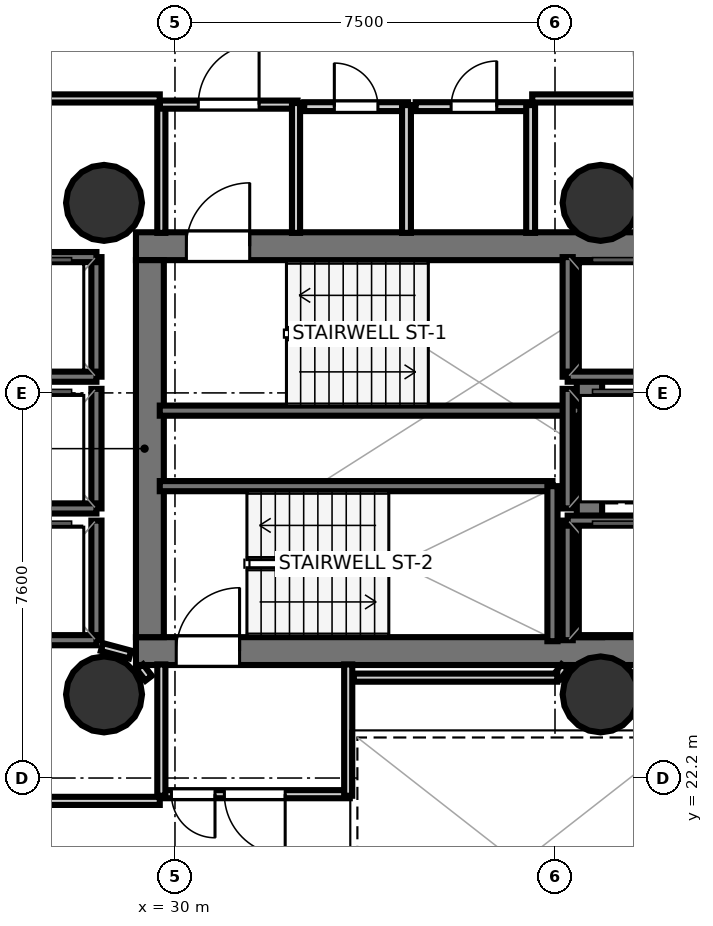
"""IFC4 building model, lengths in metres.
Left out: names, types, materials, properties, quantities, classifications, styles, units other than length and angle.
Written with IfcOpenShell. Run it as: python <this file> out.ifc"""

import sys

from ifc_helpers import new_model, si_unit, direction, frame, frame_2d, origin, origin_2d, place, context, subcontext, project, spatial, rectangle, hollow_circle, extrude, element, fill, save


model = new_model("IFC4")
c1 = context("Model", 3, precision=1e-05, world=origin(), true_north=direction((0.0, 1.0)))
c2 = subcontext(c1, "Body", "Model", "MODEL_VIEW")
j1 = project(units=[si_unit("LENGTHUNIT", "METRE"), si_unit("PLANEANGLEUNIT", "RADIAN")], contexts=[c1])
p1 = place(None, origin())
s1 = spatial("IfcSite", under=j1, at=p1, CompositionType="ELEMENT")
p2 = place(p1, origin())
s2 = spatial("IfcBuilding", under=s1, at=p2, CompositionType="ELEMENT")
p3 = place(p2, frame((0.0, 0.0, 127.4)))
s3 = spatial("IfcBuildingStorey", under=s2, at=p3, CompositionType="ELEMENT", Elevation=127.4)
p4 = place(p3, frame((29.23, 32.695, 0.0), z_axis=(0.0, 0.0, 1.0), x_axis=(1.0, 0.0, 0.0)))
e1 = element("IfcWall", 1, at=p4, inside=s3, PredefinedType="SHEAR", context=c2, shape_type="SweptSolid", body=[
    extrude(rectangle(XDim=10.62, YDim=0.55, at=frame_2d((5.31, 0.0))), origin(), (0.0, 0.0, 1.0), 3.52),
])
p5 = place(p4, frame((0.995, 0.0, 0.0)))
e2 = element("IfcOpeningElement", 2, at=p5, cuts=e1, PredefinedType="OPENING", context=c2, shape_type="SweptSolid", body=[
    extrude(rectangle(XDim=1.25, YDim=2.15, at=frame_2d((0.625, 1.075))), frame((0.0, 0.285, 0.0), z_axis=(0.0, -1.0, 0.0), x_axis=(1.0, 0.0, 0.0)), (0.0, 0.0, 1.0), 0.57),
])
p6 = place(p3, frame((29.23, 24.705, 0.0), z_axis=(0.0, 0.0, 1.0), x_axis=(1.0, 0.0, 0.0)))
e3 = element("IfcWall", 3, at=p6, inside=s3, PredefinedType="SHEAR", context=c2, shape_type="SweptSolid", body=[
    extrude(rectangle(XDim=10.62, YDim=0.55, at=frame_2d((5.31, 0.0))), origin(), (0.0, 0.0, 1.0), 3.52),
])
p7 = place(p6, frame((0.795, 0.0, 0.0)))
e4 = element("IfcOpeningElement", 4, at=p7, cuts=e3, PredefinedType="OPENING", context=c2, shape_type="SweptSolid", body=[
    extrude(rectangle(XDim=1.25, YDim=2.15, at=frame_2d((0.625, 1.075))), frame((0.0, 0.285, 0.0), z_axis=(0.0, -1.0, 0.0), x_axis=(1.0, 0.0, 0.0)), (0.0, 0.0, 1.0), 0.57),
])
p8 = place(p3, frame((29.505, 24.98, 0.0), z_axis=(0.0, 0.0, 1.0), x_axis=(0.0, 1.0, 0.0)))
e5 = element("IfcWall", 5, at=p8, inside=s3, PredefinedType="SHEAR", context=c2, shape_type="SweptSolid", body=[
    extrude(rectangle(XDim=7.44, YDim=0.55, at=frame_2d((3.72, 0.0))), origin(), (0.0, 0.0, 1.0), 3.52),
])
p9 = place(p3, frame((38.18, 24.98, 0.0), z_axis=(0.0, 0.0, 1.0), x_axis=(0.0, 1.0, 0.0)))
e6 = element("IfcWall", 6, at=p9, inside=s3, PredefinedType="SHEAR", context=c2, shape_type="SweptSolid", body=[
    extrude(rectangle(XDim=7.44, YDim=0.5, at=frame_2d((3.72, 0.0))), origin(), (0.0, 0.0, 1.0), 3.52),
])
for number, where, z_axis, x_axis in (
    (7, (28.6, 33.55, 0.0), (0.0, 0.0, 1.0), (1.0, 0.0, 0.0)),
    (8, (28.6, 23.85, 0.0), (0.0, 0.0, 1.0), (1.0, 0.0, 0.0)),
    (9, (38.4, 33.55, 0.0), (0.0, 0.0, 1.0), (1.0, 0.0, 0.0)),
    (10, (38.4, 23.85, 0.0), (0.0, 0.0, 1.0), (1.0, 0.0, 0.0)),
):
    element("IfcColumn", number, at=place(p3, frame(where, z_axis=z_axis, x_axis=x_axis)), inside=s3, PredefinedType="COLUMN", context=c2, shape_type="SweptSolid", body=[
        extrude(hollow_circle(Radius=0.75, WallThickness=0.036, at=origin_2d()), origin(), (0.0, 0.0, 1.0), 3.7),
    ])
p10 = place(p3, frame((29.7, 29.45, 0.0), z_axis=(0.0, 0.0, 1.0), x_axis=(1.0, 0.0, 0.0)))
e11 = element("IfcWall", 11, at=p10, inside=s3, PredefinedType="SOLIDWALL", context=c2, shape_type="SweptSolid", body=[
    extrude(rectangle(XDim=8.3, YDim=0.2, at=frame_2d((4.15, 0.0))), origin(), (0.0, 0.0, 1.0), 3.52),
])
p11 = place(p3, frame((29.7, 27.96, 0.0), z_axis=(0.0, 0.0, 1.0), x_axis=(1.0, 0.0, 0.0)))
e12 = element("IfcWall", 12, at=p11, inside=s3, PredefinedType="SOLIDWALL", context=c2, shape_type="SweptSolid", body=[
    extrude(rectangle(XDim=7.75, YDim=0.2, at=frame_2d((3.875, 0.0))), origin(), (0.0, 0.0, 1.0), 3.52),
])
p12 = place(p3, frame((37.45, 24.9, 0.0), z_axis=(0.0, 0.0, 1.0), x_axis=(0.0, 1.0, 0.0)))
e13 = element("IfcWall", 13, at=p12, inside=s3, PredefinedType="SOLIDWALL", context=c2, shape_type="SweptSolid", body=[
    extrude(rectangle(XDim=3.06, YDim=0.2, at=frame_2d((1.53, 0.0))), origin(), (0.0, 0.0, 1.0), 3.52),
])
p13 = place(p3, frame((37.75, 30.12, 0.0), z_axis=(0.0, 0.0, 1.0), x_axis=(0.0, 1.0, 0.0)))
e14 = element("IfcWall", 14, at=p13, inside=s3, PredefinedType="SOLIDWALL", context=c2, shape_type="SweptSolid", body=[
    extrude(rectangle(XDim=2.36, YDim=0.2, at=frame_2d((1.18, 0.0))), origin(), (0.0, 0.0, 1.0), 3.52),
])
p14 = place(p3, frame((37.75, 30.12, 0.0), z_axis=(0.0, 0.0, 1.0), x_axis=(1.0, 0.0, 0.0)))
e15 = element("IfcWall", 15, at=p14, inside=s3, PredefinedType="SOLIDWALL", context=c2, shape_type="SweptSolid", body=[
    extrude(rectangle(XDim=2.1, YDim=0.2, at=frame_2d((1.05, 0.0))), origin(), (0.0, 0.0, 1.0), 3.52),
])
p15 = place(p3, frame((37.75, 24.92, 0.0), z_axis=(0.0, 0.0, 1.0), x_axis=(0.0, 1.0, 0.0)))
e16 = element("IfcWall", 16, at=p15, inside=s3, PredefinedType="SOLIDWALL", context=c2, shape_type="SweptSolid", body=[
    extrude(rectangle(XDim=2.36, YDim=0.2, at=frame_2d((1.18, 0.0))), origin(), (0.0, 0.0, 1.0), 3.52),
])
p16 = place(p3, frame((37.75, 27.28, 0.0), z_axis=(0.0, 0.0, 1.0), x_axis=(1.0, 0.0, 0.0)))
e17 = element("IfcWall", 17, at=p16, inside=s3, PredefinedType="SOLIDWALL", context=c2, shape_type="SweptSolid", body=[
    extrude(rectangle(XDim=2.1, YDim=0.2, at=frame_2d((1.05, 0.0))), origin(), (0.0, 0.0, 1.0), 3.52),
])
p17 = place(p3, frame((28.45, 30.12, 0.0), z_axis=(0.0, 0.0, 1.0), x_axis=(0.0, 1.0, 0.0)))
e18 = element("IfcWall", 18, at=p17, inside=s3, PredefinedType="SOLIDWALL", context=c2, shape_type="SweptSolid", body=[
    extrude(rectangle(XDim=2.36, YDim=0.2, at=frame_2d((1.18, 0.0))), origin(), (0.0, 0.0, 1.0), 3.52),
])
for number, where, z_axis, x_axis in (
    (19, (26.35, 32.48, 0.0), (0.0, 0.0, 1.0), (1.0, 0.0, 0.0)),
    (20, (26.35, 30.12, 0.0), (0.0, 0.0, 1.0), (1.0, 0.0, 0.0)),
):
    element("IfcWall", number, at=place(p3, frame(where, z_axis=z_axis, x_axis=x_axis)), inside=s3, PredefinedType="SOLIDWALL", context=c2, shape_type="SweptSolid", body=[
        extrude(rectangle(XDim=2.1, YDim=0.2, at=frame_2d((1.05, 0.0))), origin(), (0.0, 0.0, 1.0), 3.52),
    ])
p18 = place(p3, frame((28.45, 27.52, 0.0), z_axis=(0.0, 0.0, 1.0), x_axis=(0.0, 1.0, 0.0)))
e21 = element("IfcWall", 21, at=p18, inside=s3, PredefinedType="SOLIDWALL", context=c2, shape_type="SweptSolid", body=[
    extrude(rectangle(XDim=2.36, YDim=0.2, at=frame_2d((1.18, 0.0))), origin(), (0.0, 0.0, 1.0), 3.52),
])
p19 = place(p3, frame((26.35, 27.52, 0.0), z_axis=(0.0, 0.0, 1.0), x_axis=(1.0, 0.0, 0.0)))
e22 = element("IfcWall", 22, at=p19, inside=s3, PredefinedType="SOLIDWALL", context=c2, shape_type="SweptSolid", body=[
    extrude(rectangle(XDim=2.1, YDim=0.2, at=frame_2d((1.05, 0.0))), origin(), (0.0, 0.0, 1.0), 3.52),
])
p20 = place(p3, frame((28.45, 24.92, 0.0), z_axis=(0.0, 0.0, 1.0), x_axis=(0.0, 1.0, 0.0)))
e23 = element("IfcWall", 23, at=p20, inside=s3, PredefinedType="SOLIDWALL", context=c2, shape_type="SweptSolid", body=[
    extrude(rectangle(XDim=2.36, YDim=0.2, at=frame_2d((1.18, 0.0))), origin(), (0.0, 0.0, 1.0), 3.52),
])
p21 = place(p3, frame((26.35, 24.92, 0.0), z_axis=(0.0, 0.0, 1.0), x_axis=(1.0, 0.0, 0.0)))
e24 = element("IfcWall", 24, at=p21, inside=s3, PredefinedType="SOLIDWALL", context=c2, shape_type="SweptSolid", body=[
    extrude(rectangle(XDim=2.1, YDim=0.2, at=frame_2d((1.05, 0.0))), origin(), (0.0, 0.0, 1.0), 3.52),
])
p22 = place(p3, frame((37.75, 27.52, 0.0), z_axis=(0.0, 0.0, 1.0), x_axis=(0.0, 1.0, 0.0)))
e25 = element("IfcWall", 25, at=p22, inside=s3, PredefinedType="SOLIDWALL", context=c2, shape_type="SweptSolid", body=[
    extrude(rectangle(XDim=2.36, YDim=0.2, at=frame_2d((1.18, 0.0))), origin(), (0.0, 0.0, 1.0), 3.52),
])
p23 = place(p3, frame((29.731, 32.958, 0.0), z_axis=(0.0, 0.0, 1.0), x_axis=(0.0, 1.0, 0.0)))
e26 = element("IfcWall", 26, at=p23, inside=s3, PredefinedType="PARTITIONING", context=c2, shape_type="SweptSolid", body=[
    extrude(rectangle(XDim=2.562, YDim=0.16, at=frame_2d((1.281, 0.0))), origin(), (0.0, 0.0, 1.0), 2.84),
])
p24 = place(p3, frame((29.7, 35.489, 0.0), z_axis=(0.0, 0.0, 1.0), x_axis=(1.0, 0.0, 0.0)))
e27 = element("IfcWall", 27, at=p24, inside=s3, PredefinedType="PARTITIONING", context=c2, shape_type="SweptSolid", body=[
    extrude(rectangle(XDim=2.72, YDim=0.16, at=frame_2d((1.36, 0.0))), origin(), (0.0, 0.0, 1.0), 2.84),
])
p25 = place(p24, frame((0.76, 0.0, 0.0)))
e28 = element("IfcOpeningElement", 28, at=p25, cuts=e27, PredefinedType="OPENING", context=c2, shape_type="SweptSolid", body=[
    extrude(rectangle(XDim=1.2, YDim=2.15, at=frame_2d((0.6, 1.075))), frame((0.0, 0.09, 0.0), z_axis=(0.0, -1.0, 0.0), x_axis=(1.0, 0.0, 0.0)), (0.0, 0.0, 1.0), 0.18),
])
p26 = place(p3, frame((32.389, 35.52, 0.0), z_axis=(0.0, 0.0, 1.0), x_axis=(0.0, -1.0, 0.0)))
e29 = element("IfcWall", 29, at=p26, inside=s3, PredefinedType="PARTITIONING", context=c2, shape_type="SweptSolid", body=[
    extrude(rectangle(XDim=2.562, YDim=0.16, at=frame_2d((1.281, 0.0))), origin(), (0.0, 0.0, 1.0), 2.84),
])
p27 = place(p3, frame((33.45, 21.881, 0.0), z_axis=(0.0, 0.0, 1.0), x_axis=(-1.0, 0.0, 0.0)))
e30 = element("IfcWall", 30, at=p27, inside=s3, PredefinedType="PARTITIONING", context=c2, shape_type="SweptSolid", body=[
    extrude(rectangle(XDim=3.75, YDim=0.16, at=frame_2d((1.875, 0.0))), origin(), (0.0, 0.0, 1.0), 2.84),
])
p28 = place(p27, frame((1.275, 0.0, 0.0)))
e31 = element("IfcOpeningElement", 31, at=p28, cuts=e30, PredefinedType="OPENING", context=c2, shape_type="SweptSolid", body=[
    extrude(rectangle(XDim=1.2, YDim=2.15, at=frame_2d((0.6, 1.075))), frame((0.0, 0.09, 0.0), z_axis=(0.0, -1.0, 0.0), x_axis=(1.0, 0.0, 0.0)), (0.0, 0.0, 1.0), 0.18),
])
p29 = place(p27, frame((2.66, 0.0, 0.0)))
e32 = element("IfcOpeningElement", 32, at=p29, cuts=e30, PredefinedType="OPENING", context=c2, shape_type="SweptSolid", body=[
    extrude(rectangle(XDim=0.86, YDim=2.05, at=frame_2d((0.43, 1.025))), frame((0.0, 0.09, 0.0), z_axis=(0.0, -1.0, 0.0), x_axis=(1.0, 0.0, 0.0)), (0.0, 0.0, 1.0), 0.18),
])
for number, where, z_axis, x_axis in (
    (33, (29.731, 21.85, 0.0), (0.0, 0.0, 1.0), (0.0, 1.0, 0.0)),
    (34, (33.419, 24.442, 0.0), (0.0, 0.0, 1.0), (0.0, -1.0, 0.0)),
):
    element("IfcWall", number, at=place(p3, frame(where, z_axis=z_axis, x_axis=x_axis)), inside=s3, PredefinedType="PARTITIONING", context=c2, shape_type="SweptSolid", body=[
        extrude(rectangle(XDim=2.592, YDim=0.16, at=frame_2d((1.296, 0.0))), origin(), (0.0, 0.0, 1.0), 2.84),
    ])
p30 = place(p3, frame((32.55, 35.449, 0.0), z_axis=(0.0, 0.0, 1.0), x_axis=(1.0, 0.0, 0.0)))
e35 = element("IfcWall", 35, at=p30, inside=s3, PredefinedType="PLUMBINGWALL", context=c2, shape_type="SweptSolid", body=[
    extrude(rectangle(XDim=2.05, YDim=0.175, at=frame_2d((1.025, 0.0))), origin(), (0.0, 0.0, 1.0), 2.84),
])
p31 = place(p30, frame((0.595, 0.0, 0.0)))
e36 = element("IfcOpeningElement", 36, at=p31, cuts=e35, PredefinedType="OPENING", context=c2, shape_type="SweptSolid", body=[
    extrude(rectangle(XDim=0.86, YDim=2.05, at=frame_2d((0.43, 1.025))), frame((0.0, 0.097, 0.0), z_axis=(0.0, -1.0, 0.0), x_axis=(1.0, 0.0, 0.0)), (0.0, 0.0, 1.0), 0.195),
])
p32 = place(p3, frame((34.569, 35.48, 0.0), z_axis=(0.0, 0.0, 1.0), x_axis=(0.0, -1.0, 0.0)))
e37 = element("IfcWall", 37, at=p32, inside=s3, PredefinedType="PLUMBINGWALL", context=c2, shape_type="SweptSolid", body=[
    extrude(rectangle(XDim=2.522, YDim=0.175, at=frame_2d((1.261, 0.0))), origin(), (0.0, 0.0, 1.0), 2.84),
])
p33 = place(p3, frame((34.75, 35.449, 0.0), z_axis=(0.0, 0.0, 1.0), x_axis=(1.0, 0.0, 0.0)))
e38 = element("IfcWall", 38, at=p33, inside=s3, PredefinedType="PLUMBINGWALL", context=c2, shape_type="SweptSolid", body=[
    extrude(rectangle(XDim=2.3, YDim=0.175, at=frame_2d((1.15, 0.0))), origin(), (0.0, 0.0, 1.0), 2.84),
])
p34 = place(p33, frame((0.7, 0.0, 0.0)))
e39 = element("IfcOpeningElement", 39, at=p34, cuts=e38, PredefinedType="OPENING", context=c2, shape_type="SweptSolid", body=[
    extrude(rectangle(XDim=0.9, YDim=2.1, at=frame_2d((0.45, 1.05))), frame((0.0, 0.097, 0.0), z_axis=(0.0, -1.0, 0.0), x_axis=(1.0, 0.0, 0.0)), (0.0, 0.0, 1.0), 0.195),
])
p35 = place(p3, frame((37.019, 35.48, 0.0), z_axis=(0.0, 0.0, 1.0), x_axis=(0.0, -1.0, 0.0)))
e40 = element("IfcWall", 40, at=p35, inside=s3, PredefinedType="PLUMBINGWALL", context=c2, shape_type="SweptSolid", body=[
    extrude(rectangle(XDim=2.522, YDim=0.175, at=frame_2d((1.261, 0.0))), origin(), (0.0, 0.0, 1.0), 2.84),
])
p36 = place(p3, frame((29.48, 24.169, 0.0), z_axis=(0.0, 0.0, 1.0), x_axis=(-0.607608252226, 0.794236873878, 0.0)))
e41 = element("IfcWall", 41, at=p36, inside=s3, PredefinedType="PARTITIONING", context=c2, shape_type="SweptSolid", body=[
    extrude(rectangle(XDim=0.286, YDim=0.16, at=frame_2d((0.143, 0.0))), origin(), (0.0, 0.0, 1.0), 2.84),
])
p37 = place(p3, frame((29.114, 24.637, 0.0), z_axis=(0.0, 0.0, 1.0), x_axis=(-0.966199685486, 0.257794817183, 0.0)))
e42 = element("IfcWall", 42, at=p37, inside=s3, PredefinedType="PARTITIONING", context=c2, shape_type="SweptSolid", body=[
    extrude(rectangle(XDim=0.575, YDim=0.16, at=frame_2d((0.288, 0.0))), origin(), (0.0, 0.0, 1.0), 2.84),
])
p38 = place(p3, frame((37.694, 24.396, 0.0), z_axis=(0.0, 0.0, 1.0), x_axis=(-0.607118658061, -0.794611184815, 0.0)))
e43 = element("IfcWall", 43, at=p38, inside=s3, PredefinedType="PARTITIONING", context=c2, shape_type="SweptSolid", body=[
    extrude(rectangle(XDim=0.246, YDim=0.16, at=frame_2d((0.123, 0.0))), origin(), (0.0, 0.0, 1.0), 2.84),
])
p39 = place(p3, frame((37.545, 24.181, 0.0), z_axis=(0.0, 0.0, 1.0), x_axis=(-1.0, 0.0, 0.0)))
e44 = element("IfcWall", 44, at=p39, inside=s3, PredefinedType="PARTITIONING", context=c2, shape_type="SweptSolid", body=[
    extrude(rectangle(XDim=4.015, YDim=0.16, at=frame_2d((2.007, 0.0))), origin(), (0.0, 0.0, 1.0), 2.84),
])
p40 = place(p3, frame((39.818, 35.611, 0.0), z_axis=(0.0, 0.0, 1.0), x_axis=(-1.0, 0.0, 0.0)))
e45 = element("IfcWall", 45, at=p40, inside=s3, PredefinedType="PARTITIONING", context=c2, shape_type="SweptSolid", body=[
    extrude(rectangle(XDim=2.768, YDim=0.16, at=frame_2d((1.384, 0.0))), origin(), (0.0, 0.0, 1.0), 2.84),
])
for number, where, z_axis, x_axis in (
    (46, (29.7, 35.611, 0.0), (0.0, 0.0, 1.0), (-1.0, 0.0, 0.0)),
    (47, (26.42, 21.749, 0.0), (0.0, 0.0, 1.0), (1.0, 0.0, 0.0)),
):
    element("IfcWall", number, at=place(p3, frame(where, z_axis=z_axis, x_axis=x_axis)), inside=s3, PredefinedType="PARTITIONING", context=c2, shape_type="SweptSolid", body=[
        extrude(rectangle(XDim=3.28, YDim=0.16, at=frame_2d((1.64, 0.0))), origin(), (0.0, 0.0, 1.0), 2.84),
    ])
p41 = place(p5, origin())
e48 = element("IfcDoor", 48, at=p41, inside=s3, OperationType="SINGLE_SWING_RIGHT", PredefinedType="DOOR", context=c2, shape_type="SweptSolid", body=[
    extrude(rectangle(XDim=1.25, YDim=2.15, at=frame_2d((0.625, 1.075))), frame((0.0, 0.025, 0.0), z_axis=(0.0, -1.0, 0.0), x_axis=(1.0, 0.0, 0.0)), (0.0, 0.0, 1.0), 0.05),
])
fill(e2, e48)
p42 = place(p7, origin())
e49 = element("IfcDoor", 49, at=p42, inside=s3, OperationType="SINGLE_SWING_RIGHT", PredefinedType="DOOR", context=c2, shape_type="SweptSolid", body=[
    extrude(rectangle(XDim=1.25, YDim=2.15, at=frame_2d((0.625, 1.075))), frame((0.0, 0.025, 0.0), z_axis=(0.0, -1.0, 0.0), x_axis=(1.0, 0.0, 0.0)), (0.0, 0.0, 1.0), 0.05),
])
fill(e4, e49)
p43 = place(p25, origin())
e50 = element("IfcDoor", 50, at=p43, inside=s3, OperationType="SINGLE_SWING_RIGHT", PredefinedType="DOOR", context=c2, shape_type="SweptSolid", body=[
    extrude(rectangle(XDim=1.2, YDim=2.15, at=frame_2d((0.6, 1.075))), frame((0.0, 0.025, 0.0), z_axis=(0.0, -1.0, 0.0), x_axis=(1.0, 0.0, 0.0)), (0.0, 0.0, 1.0), 0.05),
])
fill(e28, e50)
p44 = place(p28, origin())
e51 = element("IfcDoor", 51, at=p44, inside=s3, OperationType="SINGLE_SWING_LEFT", PredefinedType="DOOR", context=c2, shape_type="SweptSolid", body=[
    extrude(rectangle(XDim=1.2, YDim=2.15, at=frame_2d((0.6, 1.075))), frame((0.0, 0.025, 0.0), z_axis=(0.0, -1.0, 0.0), x_axis=(1.0, 0.0, 0.0)), (0.0, 0.0, 1.0), 0.05),
])
fill(e31, e51)
p45 = place(p31, origin())
e52 = element("IfcDoor", 52, at=p45, inside=s3, OperationType="SINGLE_SWING_LEFT", PredefinedType="DOOR", context=c2, shape_type="SweptSolid", body=[
    extrude(rectangle(XDim=0.86, YDim=2.05, at=frame_2d((0.43, 1.025))), frame((0.0, 0.025, 0.0), z_axis=(0.0, -1.0, 0.0), x_axis=(1.0, 0.0, 0.0)), (0.0, 0.0, 1.0), 0.05),
])
fill(e36, e52)
p46 = place(p34, origin())
e53 = element("IfcDoor", 53, at=p46, inside=s3, OperationType="SINGLE_SWING_RIGHT", PredefinedType="DOOR", context=c2, shape_type="SweptSolid", body=[
    extrude(rectangle(XDim=0.9, YDim=2.1, at=frame_2d((0.45, 1.05))), frame((0.0, 0.025, 0.0), z_axis=(0.0, -1.0, 0.0), x_axis=(1.0, 0.0, 0.0)), (0.0, 0.0, 1.0), 0.05),
])
fill(e39, e53)
p47 = place(p29, origin())
e54 = element("IfcDoor", 54, at=p47, inside=s3, OperationType="SINGLE_SWING_LEFT", PredefinedType="DOOR", context=c2, shape_type="SweptSolid", body=[
    extrude(rectangle(XDim=0.86, YDim=2.05, at=frame_2d((0.43, 1.025))), frame((0.0, 0.025, 0.0), z_axis=(0.0, -1.0, 0.0), x_axis=(1.0, 0.0, 0.0)), (0.0, 0.0, 1.0), 0.05),
])
fill(e32, e54)
save(model, sys.argv[1])
